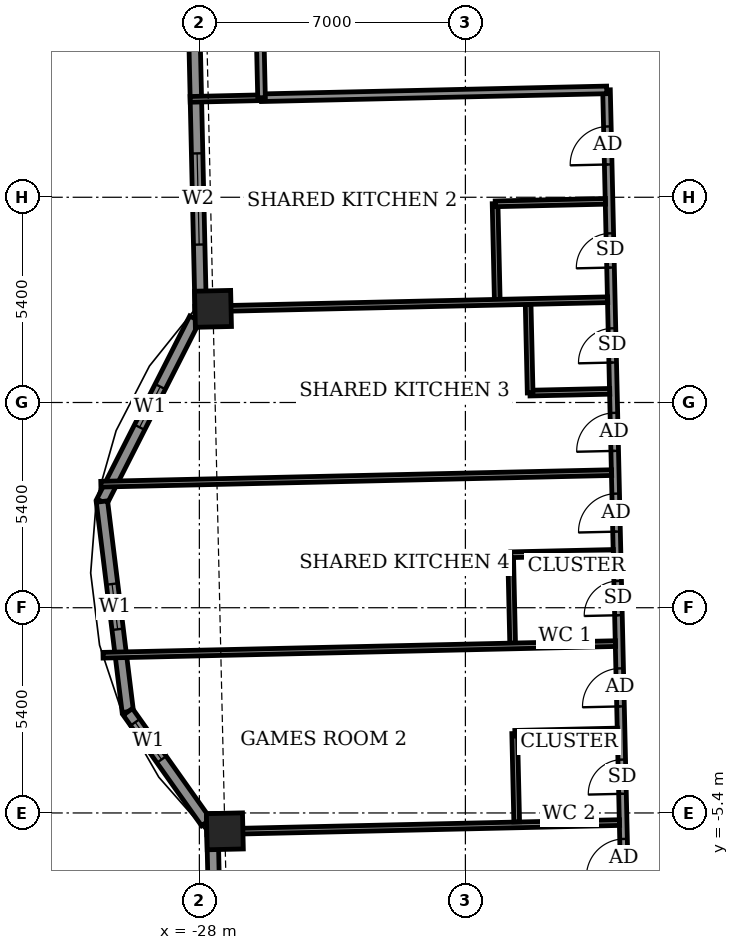
"""IFC4 building model, lengths in metres.
Left out: names, types, materials, properties, quantities, classifications, styles, units other than length and angle.
Written with IfcOpenShell. Run it as: python <this file> out.ifc"""

import sys

from ifc_helpers import new_model, si_unit, direction, frame, frame_2d, origin, origin_2d, place, context, subcontext, project, spatial, rectangle, extrude, element, fill, save


model = new_model("IFC4")
c1 = context("Model", 3, precision=1e-05, world=origin(), true_north=direction((0.0, 1.0)))
c2 = subcontext(c1, "Body", "Model", "MODEL_VIEW")
j1 = project(units=[si_unit("LENGTHUNIT", "METRE"), si_unit("PLANEANGLEUNIT", "RADIAN")], contexts=[c1])
p1 = place(None, origin())
s1 = spatial("IfcSite", under=j1, at=p1, CompositionType="ELEMENT")
p2 = place(p1, origin())
s2 = spatial("IfcBuilding", under=s1, at=p2, CompositionType="ELEMENT")
p3 = place(p2, frame((0.0, 0.0, 297.9)))
s3 = spatial("IfcBuildingStorey", under=s2, at=p3, CompositionType="ELEMENT", Elevation=297.9)
for number, where, z_axis, x_axis in (
    (1, (-27.329, -5.883, -0.55), (0.0, 0.0, 1.0), (0.023, -1.0, 0.0)),
    (2, (-27.641, 7.864, -0.55), (0.0, 0.0, 1.0), (0.023, -1.0, 0.0)),
):
    element("IfcColumn", number, at=place(p3, frame(where, z_axis=z_axis, x_axis=x_axis)), inside=s3, PredefinedType="COLUMN", context=c2, shape_type="SweptSolid", body=[
        extrude(rectangle(XDim=0.95, YDim=0.95, at=origin_2d()), origin(), (0.0, 0.0, 1.0), 3.6),
    ])
p4 = place(p3, frame((-28.297, 22.427, 0.0), z_axis=(0.0, 0.0, 1.0), x_axis=(0.02269714286, -0.999742386671, 0.0)))
e3 = element("IfcWall", 3, at=p4, inside=s3, PredefinedType="SOLIDWALL", context=c2, shape_type="SweptSolid", body=[
    extrude(rectangle(XDim=14.629, YDim=0.3, at=frame_2d((7.314, 0.0))), origin(), (0.0, 0.0, 1.0), 2.5),
])
p5 = place(p4, frame((3.002, 0.0, 0.0)))
e4 = element("IfcOpeningElement", 4, at=p5, cuts=e3, PredefinedType="OPENING", context=c2, shape_type="SweptSolid", body=[
    extrude(rectangle(XDim=1.5, YDim=2.4, at=frame_2d((0.75, 1.2))), frame((0.0, 0.16, 0.0), z_axis=(0.0, -1.0, 0.0), x_axis=(1.0, 0.0, 0.0)), (0.0, 0.0, 1.0), 0.32),
])
p6 = place(p4, frame((10.475, 0.0, 0.9)))
e5 = element("IfcOpeningElement", 5, at=p6, cuts=e3, PredefinedType="OPENING", context=c2, shape_type="SweptSolid", body=[
    extrude(rectangle(XDim=2.4, YDim=1.5, at=frame_2d((1.2, 0.75))), frame((0.0, 0.16, 0.0), z_axis=(0.0, -1.0, 0.0), x_axis=(1.0, 0.0, 0.0)), (0.0, 0.0, 1.0), 0.32),
])
p7 = place(p3, frame((-28.12, 7.608, 0.0), z_axis=(0.0, 0.0, 1.0), x_axis=(-0.45266802131, -0.891679125293, 0.0)))
e6 = element("IfcWall", 6, at=p7, inside=s3, PredefinedType="SOLIDWALL", context=c2, shape_type="SweptSolid", body=[
    extrude(rectangle(XDim=5.399, YDim=0.3, at=frame_2d((2.699, 0.0))), origin(), (0.0, 0.0, 1.0), 3.05),
])
p8 = place(p7, frame((2.008, 0.0, 0.9)))
e7 = element("IfcOpeningElement", 7, at=p8, cuts=e6, PredefinedType="OPENING", context=c2, shape_type="SweptSolid", body=[
    extrude(rectangle(XDim=1.2, YDim=1.5, at=frame_2d((0.6, 0.75))), frame((0.0, 0.16, 0.0), z_axis=(0.0, -1.0, 0.0), x_axis=(1.0, 0.0, 0.0)), (0.0, 0.0, 1.0), 0.32),
])
p9 = place(p3, frame((-30.564, 2.794, 0.0), z_axis=(0.0, 0.0, 1.0), x_axis=(0.122163831021, -0.992509948761, 0.0)))
e8 = element("IfcWall", 8, at=p9, inside=s3, PredefinedType="SOLIDWALL", context=c2, shape_type="SweptSolid", body=[
    extrude(rectangle(XDim=5.574, YDim=0.3, at=frame_2d((2.787, 0.0))), origin(), (0.0, 0.0, 1.0), 3.05),
])
p10 = place(p9, frame((2.187, 0.0, 0.9)))
e9 = element("IfcOpeningElement", 9, at=p10, cuts=e8, PredefinedType="OPENING", context=c2, shape_type="SweptSolid", body=[
    extrude(rectangle(XDim=1.2, YDim=1.5, at=frame_2d((0.6, 0.75))), frame((0.0, 0.16, 0.0), z_axis=(0.0, -1.0, 0.0), x_axis=(1.0, 0.0, 0.0)), (0.0, 0.0, 1.0), 0.32),
])
p11 = place(p3, frame((-29.883, -2.738, 0.0), z_axis=(0.0, 0.0, 1.0), x_axis=(0.578095163598, -0.815969351033, 0.0)))
e10 = element("IfcWall", 10, at=p11, inside=s3, PredefinedType="SOLIDWALL", context=c2, shape_type="SweptSolid", body=[
    extrude(rectangle(XDim=3.569, YDim=0.3, at=frame_2d((1.784, 0.0))), origin(), (0.0, 0.0, 1.0), 3.05),
])
p12 = place(p11, frame((0.338, 0.0, 0.9)))
e11 = element("IfcOpeningElement", 11, at=p12, cuts=e10, PredefinedType="OPENING", context=c2, shape_type="SweptSolid", body=[
    extrude(rectangle(XDim=1.2, YDim=1.5, at=frame_2d((0.6, 0.75))), frame((0.0, 0.16, 0.0), z_axis=(0.0, -1.0, 0.0), x_axis=(1.0, 0.0, 0.0)), (0.0, 0.0, 1.0), 0.32),
])
p13 = place(p3, frame((-27.665, -5.416, 0.0), z_axis=(0.0, 0.0, 1.0), x_axis=(0.022660024814, -0.999743228672, 0.0)))
e12 = element("IfcWall", 12, at=p13, inside=s3, PredefinedType="SOLIDWALL", context=c2, shape_type="SweptSolid", body=[
    extrude(rectangle(XDim=15.45, YDim=0.3, at=frame_2d((7.725, 0.0))), origin(), (0.0, 0.0, 1.0), 2.55),
])
p14 = place(p13, frame((1.975, 0.0, 0.0)))
e13 = element("IfcOpeningElement", 13, at=p14, cuts=e12, PredefinedType="OPENING", context=c2, shape_type="SweptSolid", body=[
    extrude(rectangle(XDim=1.5, YDim=2.4, at=frame_2d((0.75, 1.2))), frame((0.0, 0.16, 0.0), z_axis=(0.0, -1.0, 0.0), x_axis=(1.0, 0.0, 0.0)), (0.0, 0.0, 1.0), 0.32),
])
p15 = place(p13, frame((6.171, 0.0, 0.9)))
e14 = element("IfcOpeningElement", 14, at=p15, cuts=e12, PredefinedType="OPENING", context=c2, shape_type="SweptSolid", body=[
    extrude(rectangle(XDim=1.2, YDim=1.5, at=frame_2d((0.6, 0.75))), frame((0.0, 0.16, 0.0), z_axis=(0.0, -1.0, 0.0), x_axis=(1.0, 0.0, 0.0)), (0.0, 0.0, 1.0), 0.32),
])
p16 = place(p13, frame((8.05, 0.0, 0.9)))
e15 = element("IfcOpeningElement", 15, at=p16, cuts=e12, PredefinedType="OPENING", context=c2, shape_type="SweptSolid", body=[
    extrude(rectangle(XDim=0.9, YDim=1.5, at=frame_2d((0.45, 0.75))), frame((0.0, 0.16, 0.0), z_axis=(0.0, -1.0, 0.0), x_axis=(1.0, 0.0, 0.0)), (0.0, 0.0, 1.0), 0.32),
])
p17 = place(p13, frame((11.625, 0.0, 0.9)))
e16 = element("IfcOpeningElement", 16, at=p17, cuts=e12, PredefinedType="OPENING", context=c2, shape_type="SweptSolid", body=[
    extrude(rectangle(XDim=2.4, YDim=1.5, at=frame_2d((1.2, 0.75))), frame((0.0, 0.16, 0.0), z_axis=(0.0, -1.0, 0.0), x_axis=(1.0, 0.0, 0.0)), (0.0, 0.0, 1.0), 0.32),
])
p18 = place(p3, frame((-30.802, 10.917, 0.0), z_axis=(0.0, 0.0, 1.0), x_axis=(-0.022665943652, 0.999743094499, 0.0)))
e17 = element("IfcWall", 17, at=p18, inside=s3, PredefinedType="USERDEFINED", context=c2, shape_type="SweptSolid", body=[
    extrude(rectangle(XDim=6.0, YDim=0.55, at=frame_2d((3.0, 0.0))), origin(), (0.0, 0.0, 1.0), 0.8),
])
p19 = place(p3, frame((-30.348, -9.078, 0.0), z_axis=(0.0, 0.0, 1.0), x_axis=(-0.022677031611, 0.999742843054, 0.0)))
e18 = element("IfcWall", 18, at=p19, inside=s3, PredefinedType="USERDEFINED", context=c2, shape_type="SweptSolid", body=[
    extrude(rectangle(XDim=2.875, YDim=0.55, at=frame_2d((1.437, 0.0))), origin(), (0.0, 0.0, 1.0), 0.8),
])
p20 = place(p3, frame((-16.684, -12.919, 0.0), z_axis=(0.0, 0.0, 1.0), x_axis=(-0.022712214871, 0.999742044377, 0.0)))
e19 = element("IfcWall", 19, at=p20, inside=s3, PredefinedType="PARTITIONING", context=c2, shape_type="SweptSolid", body=[
    extrude(rectangle(XDim=26.551, YDim=0.2, at=frame_2d((13.275, 0.0))), origin(), (0.0, 0.0, 1.0), 3.05),
])
p21 = place(p20, frame((24.588, 0.0, 0.0)))
e20 = element("IfcOpeningElement", 20, at=p21, cuts=e19, PredefinedType="OPENING", context=c2, shape_type="SweptSolid", body=[
    extrude(rectangle(XDim=1.0, YDim=2.1, at=frame_2d((0.5, 1.05))), frame((0.0, 0.11, 0.0), z_axis=(0.0, -1.0, 0.0), x_axis=(1.0, 0.0, 0.0)), (0.0, 0.0, 1.0), 0.22),
])
p22 = place(p20, frame((21.875, 0.0, 0.0)))
e21 = element("IfcOpeningElement", 21, at=p22, cuts=e19, PredefinedType="OPENING", context=c2, shape_type="SweptSolid", body=[
    extrude(rectangle(XDim=0.9, YDim=2.1, at=frame_2d((0.45, 1.05))), frame((0.0, 0.11, 0.0), z_axis=(0.0, -1.0, 0.0), x_axis=(1.0, 0.0, 0.0)), (0.0, 0.0, 1.0), 0.22),
])
p23 = place(p20, frame((17.05, 0.0, 0.0)))
e22 = element("IfcOpeningElement", 22, at=p23, cuts=e19, PredefinedType="OPENING", context=c2, shape_type="SweptSolid", body=[
    extrude(rectangle(XDim=1.0, YDim=2.1, at=frame_2d((0.5, 1.05))), frame((0.0, 0.11, 0.0), z_axis=(0.0, -1.0, 0.0), x_axis=(1.0, 0.0, 0.0)), (0.0, 0.0, 1.0), 0.22),
])
p24 = place(p20, frame((19.375, 0.0, 0.0)))
e23 = element("IfcOpeningElement", 23, at=p24, cuts=e19, PredefinedType="OPENING", context=c2, shape_type="SweptSolid", body=[
    extrude(rectangle(XDim=0.9, YDim=2.1, at=frame_2d((0.45, 1.05))), frame((0.0, 0.11, 0.0), z_axis=(0.0, -1.0, 0.0), x_axis=(1.0, 0.0, 0.0)), (0.0, 0.0, 1.0), 0.22),
])
p25 = place(p20, frame((14.925, 0.0, 0.0)))
e24 = element("IfcOpeningElement", 24, at=p25, cuts=e19, PredefinedType="OPENING", context=c2, shape_type="SweptSolid", body=[
    extrude(rectangle(XDim=1.0, YDim=2.1, at=frame_2d((0.5, 1.05))), frame((0.0, 0.11, 0.0), z_axis=(0.0, -1.0, 0.0), x_axis=(1.0, 0.0, 0.0)), (0.0, 0.0, 1.0), 0.22),
])
p26 = place(p20, frame((12.725, 0.0, 0.0)))
e25 = element("IfcOpeningElement", 25, at=p26, cuts=e19, PredefinedType="OPENING", context=c2, shape_type="SweptSolid", body=[
    extrude(rectangle(XDim=0.9, YDim=2.1, at=frame_2d((0.45, 1.05))), frame((0.0, 0.11, 0.0), z_axis=(0.0, -1.0, 0.0), x_axis=(1.0, 0.0, 0.0)), (0.0, 0.0, 1.0), 0.22),
])
p27 = place(p20, frame((10.325, 0.0, 0.0)))
e26 = element("IfcOpeningElement", 26, at=p27, cuts=e19, PredefinedType="OPENING", context=c2, shape_type="SweptSolid", body=[
    extrude(rectangle(XDim=1.0, YDim=2.1, at=frame_2d((0.5, 1.05))), frame((0.0, 0.11, 0.0), z_axis=(0.0, -1.0, 0.0), x_axis=(1.0, 0.0, 0.0)), (0.0, 0.0, 1.0), 0.22),
])
p28 = place(p20, frame((8.025, 0.0, 0.0)))
e27 = element("IfcOpeningElement", 27, at=p28, cuts=e19, PredefinedType="OPENING", context=c2, shape_type="SweptSolid", body=[
    extrude(rectangle(XDim=0.9, YDim=2.1, at=frame_2d((0.45, 1.05))), frame((0.0, 0.11, 0.0), z_axis=(0.0, -1.0, 0.0), x_axis=(1.0, 0.0, 0.0)), (0.0, 0.0, 1.0), 0.22),
])
p29 = place(p20, frame((5.837, 0.0, 0.0)))
e28 = element("IfcOpeningElement", 28, at=p29, cuts=e19, PredefinedType="OPENING", context=c2, shape_type="SweptSolid", body=[
    extrude(rectangle(XDim=1.0, YDim=2.1, at=frame_2d((0.5, 1.05))), frame((0.0, 0.11, 0.0), z_axis=(0.0, -1.0, 0.0), x_axis=(1.0, 0.0, 0.0)), (0.0, 0.0, 1.0), 0.22),
])
p30 = place(p20, frame((3.75, 0.0, 0.0)))
e29 = element("IfcOpeningElement", 29, at=p30, cuts=e19, PredefinedType="OPENING", context=c2, shape_type="SweptSolid", body=[
    extrude(rectangle(XDim=0.9, YDim=2.1, at=frame_2d((0.45, 1.05))), frame((0.0, 0.11, 0.0), z_axis=(0.0, -1.0, 0.0), x_axis=(1.0, 0.0, 0.0)), (0.0, 0.0, 1.0), 0.22),
])
p31 = place(p3, frame((-27.804, -5.899, 0.0), z_axis=(0.0, 0.0, 1.0), x_axis=(0.999743850541, 0.02263257177, 0.0)))
e30 = element("IfcWall", 30, at=p31, inside=s3, PredefinedType="PARTITIONING", context=c2, shape_type="SweptSolid", body=[
    extrude(rectangle(XDim=10.863, YDim=0.15, at=frame_2d((5.431, 0.0))), origin(), (0.0, 0.0, 1.0), 3.05),
])
p32 = place(p3, frame((-19.65, -5.634, 0.0), z_axis=(0.0, 0.0, 1.0), x_axis=(-0.02279059109, 0.999740260747, 0.0)))
e31 = element("IfcWall", 31, at=p32, inside=s3, PredefinedType="PARTITIONING", context=c2, shape_type="SweptSolid", body=[
    extrude(rectangle(XDim=2.324, YDim=0.15, at=frame_2d((1.162, 0.0))), origin(), (0.0, 0.0, 1.0), 3.05),
])
p33 = place(p3, frame((-19.698, -3.304, 0.0), z_axis=(0.0, 0.0, 1.0), x_axis=(0.999744396973, 0.02260842146, 0.0)))
e32 = element("IfcWall", 32, at=p33, inside=s3, PredefinedType="PARTITIONING", context=c2, shape_type="SweptSolid", body=[
    extrude(rectangle(XDim=2.7, YDim=0.15, at=frame_2d((1.35, 0.0))), origin(), (0.0, 0.0, 1.0), 3.05),
])
p34 = place(p3, frame((-19.757, -0.935, 0.0), z_axis=(0.0, 0.0, 1.0), x_axis=(-0.02279059109, 0.999740260747, 0.0)))
e33 = element("IfcWall", 33, at=p34, inside=s3, PredefinedType="PARTITIONING", context=c2, shape_type="SweptSolid", body=[
    extrude(rectangle(XDim=2.324, YDim=0.15, at=frame_2d((1.162, 0.0))), origin(), (0.0, 0.0, 1.0), 3.05),
])
p35 = place(p3, frame((-30.535, -1.25, 0.0), z_axis=(0.0, 0.0, 1.0), x_axis=(0.999742750552, 0.022681109296, 0.0)))
e34 = element("IfcWall", 34, at=p35, inside=s3, PredefinedType="PARTITIONING", context=c2, shape_type="SweptSolid", body=[
    extrude(rectangle(XDim=13.487, YDim=0.15, at=frame_2d((6.744, 0.0))), origin(), (0.0, 0.0, 1.0), 2.05),
])
p36 = place(p3, frame((-19.805, 1.394, 0.0), z_axis=(0.0, 0.0, 1.0), x_axis=(0.999736346258, 0.022961663075, 0.0)))
e35 = element("IfcWall", 35, at=p36, inside=s3, PredefinedType="PARTITIONING", context=c2, shape_type="SweptSolid", body=[
    extrude(rectangle(XDim=2.701, YDim=0.15, at=frame_2d((1.35, 0.0))), origin(), (0.0, 0.0, 1.0), 3.05),
])
p37 = place(p3, frame((-30.592, 3.25, 0.0), z_axis=(0.0, 0.0, 1.0), x_axis=(0.999742678725, 0.022684275074, 0.0)))
e36 = element("IfcWall", 36, at=p37, inside=s3, PredefinedType="PARTITIONING", context=c2, shape_type="SweptSolid", body=[
    extrude(rectangle(XDim=13.442, YDim=0.15, at=frame_2d((6.721, 0.0))), origin(), (0.0, 0.0, 1.0), 2.05),
])
p38 = place(p3, frame((-19.301, 5.647, 0.0), z_axis=(0.0, 0.0, 1.0), x_axis=(0.999748159451, 0.022441427631, 0.0)))
e37 = element("IfcWall", 37, at=p38, inside=s3, PredefinedType="PARTITIONING", context=c2, shape_type="SweptSolid", body=[
    extrude(rectangle(XDim=2.1, YDim=0.15, at=frame_2d((1.05, 0.0))), origin(), (0.0, 0.0, 1.0), 3.05),
])
p39 = place(p3, frame((-19.296, 5.652, 0.0), z_axis=(0.0, 0.0, 1.0), x_axis=(-0.022895561926, 0.999737862264, 0.0)))
e38 = element("IfcWall", 38, at=p39, inside=s3, PredefinedType="PARTITIONING", context=c2, shape_type="SweptSolid", body=[
    extrude(rectangle(XDim=2.324, YDim=0.15, at=frame_2d((1.162, 0.0))), origin(), (0.0, 0.0, 1.0), 3.05),
])
p40 = place(p3, frame((-20.162, 8.108, 0.0), z_axis=(0.0, 0.0, 1.0), x_axis=(-0.022530308093, 0.999746160391, 0.0)))
e39 = element("IfcWall", 39, at=p40, inside=s3, PredefinedType="PARTITIONING", context=c2, shape_type="SweptSolid", body=[
    extrude(rectangle(XDim=2.525, YDim=0.15, at=frame_2d((1.262, 0.0))), origin(), (0.0, 0.0, 1.0), 3.05),
])
p41 = place(p3, frame((-28.116, 7.857, 0.0), z_axis=(0.0, 0.0, 1.0), x_axis=(0.999741301527, 0.022744890004, 0.0)))
e40 = element("IfcWall", 40, at=p41, inside=s3, PredefinedType="PARTITIONING", context=c2, shape_type="SweptSolid", body=[
    extrude(rectangle(XDim=10.863, YDim=0.15, at=frame_2d((5.431, 0.0))), origin(), (0.0, 0.0, 1.0), 3.05),
])
p42 = place(p3, frame((-20.214, 10.627, 0.0), z_axis=(0.0, 0.0, 1.0), x_axis=(0.999739701447, 0.022815112345, 0.0)))
e41 = element("IfcWall", 41, at=p42, inside=s3, PredefinedType="PARTITIONING", context=c2, shape_type="SweptSolid", body=[
    extrude(rectangle(XDim=2.9, YDim=0.15, at=frame_2d((1.45, 0.0))), origin(), (0.0, 0.0, 1.0), 3.05),
])
p43 = place(p3, frame((-28.242, 13.376, 0.0), z_axis=(0.0, 0.0, 1.0), x_axis=(0.999738606422, 0.022863045053, 0.0)))
e42 = element("IfcWall", 42, at=p43, inside=s3, PredefinedType="PARTITIONING", context=c2, shape_type="SweptSolid", body=[
    extrude(rectangle(XDim=1.879, YDim=0.15, at=frame_2d((0.94, 0.0))), origin(), (0.0, 0.0, 1.0), 2.5),
])
p44 = place(p3, frame((-26.367, 13.419, 0.0), z_axis=(0.0, 0.0, 1.0), x_axis=(0.999742888587, 0.022675024131, 0.0)))
e43 = element("IfcWall", 43, at=p44, inside=s3, PredefinedType="PARTITIONING", context=c2, shape_type="SweptSolid", body=[
    extrude(rectangle(XDim=9.087, YDim=0.2, at=frame_2d((4.544, 0.0))), origin(), (0.0, 0.0, 1.0), 3.05),
])
p45 = place(p3, frame((-26.364, 13.419, 0.0), z_axis=(0.0, 0.0, 1.0), x_axis=(-0.022632637625, 0.99974384905, 0.0)))
e44 = element("IfcWall", 44, at=p45, inside=s3, PredefinedType="PARTITIONING", context=c2, shape_type="SweptSolid", body=[
    extrude(rectangle(XDim=1.5, YDim=0.2, at=frame_2d((0.75, 0.0))), origin(), (0.0, 0.0, 1.0), 3.05),
])
p46 = place(p6, origin())
e45 = element("IfcWindow", 45, at=p46, inside=s3, PartitioningType="DOUBLE_PANEL_VERTICAL", PredefinedType="WINDOW", context=c2, shape_type="SweptSolid", body=[
    extrude(rectangle(XDim=2.4, YDim=1.5, at=frame_2d((1.2, 0.75))), frame((0.0, 0.03, 0.0), z_axis=(0.0, -1.0, 0.0), x_axis=(1.0, 0.0, 0.0)), (0.0, 0.0, 1.0), 0.06),
])
fill(e5, e45)
p47 = place(p8, origin())
e46 = element("IfcWindow", 46, at=p47, inside=s3, PartitioningType="SINGLE_PANEL", PredefinedType="WINDOW", context=c2, shape_type="SweptSolid", body=[
    extrude(rectangle(XDim=1.2, YDim=1.5, at=frame_2d((0.6, 0.75))), frame((0.0, 0.03, 0.0), z_axis=(0.0, -1.0, 0.0), x_axis=(1.0, 0.0, 0.0)), (0.0, 0.0, 1.0), 0.06),
])
fill(e7, e46)
p48 = place(p10, origin())
e47 = element("IfcWindow", 47, at=p48, inside=s3, PartitioningType="SINGLE_PANEL", PredefinedType="WINDOW", context=c2, shape_type="SweptSolid", body=[
    extrude(rectangle(XDim=1.2, YDim=1.5, at=frame_2d((0.6, 0.75))), frame((0.0, 0.03, 0.0), z_axis=(0.0, -1.0, 0.0), x_axis=(1.0, 0.0, 0.0)), (0.0, 0.0, 1.0), 0.06),
])
fill(e9, e47)
p49 = place(p12, origin())
e48 = element("IfcWindow", 48, at=p49, inside=s3, PartitioningType="SINGLE_PANEL", PredefinedType="WINDOW", context=c2, shape_type="SweptSolid", body=[
    extrude(rectangle(XDim=1.2, YDim=1.5, at=frame_2d((0.6, 0.75))), frame((0.0, 0.03, 0.0), z_axis=(0.0, -1.0, 0.0), x_axis=(1.0, 0.0, 0.0)), (0.0, 0.0, 1.0), 0.06),
])
fill(e11, e48)
p50 = place(p21, origin())
e49 = element("IfcDoor", 49, at=p50, inside=s3, OperationType="SINGLE_SWING_LEFT", PredefinedType="DOOR", context=c2, shape_type="SweptSolid", body=[
    extrude(rectangle(XDim=1.0, YDim=2.1, at=frame_2d((0.5, 1.05))), frame((0.0, 0.025, 0.0), z_axis=(0.0, -1.0, 0.0), x_axis=(1.0, 0.0, 0.0)), (0.0, 0.0, 1.0), 0.05),
])
fill(e20, e49)
p51 = place(p22, origin())
e50 = element("IfcDoor", 50, at=p51, inside=s3, OperationType="SINGLE_SWING_LEFT", PredefinedType="DOOR", context=c2, shape_type="SweptSolid", body=[
    extrude(rectangle(XDim=0.9, YDim=2.1, at=frame_2d((0.45, 1.05))), frame((0.0, 0.025, 0.0), z_axis=(0.0, -1.0, 0.0), x_axis=(1.0, 0.0, 0.0)), (0.0, 0.0, 1.0), 0.05),
])
fill(e21, e50)
p52 = place(p23, origin())
e51 = element("IfcDoor", 51, at=p52, inside=s3, OperationType="SINGLE_SWING_RIGHT", PredefinedType="DOOR", context=c2, shape_type="SweptSolid", body=[
    extrude(rectangle(XDim=1.0, YDim=2.1, at=frame_2d((0.5, 1.05))), frame((0.0, 0.025, 0.0), z_axis=(0.0, -1.0, 0.0), x_axis=(1.0, 0.0, 0.0)), (0.0, 0.0, 1.0), 0.05),
])
fill(e22, e51)
p53 = place(p24, origin())
e52 = element("IfcDoor", 52, at=p53, inside=s3, OperationType="SINGLE_SWING_RIGHT", PredefinedType="DOOR", context=c2, shape_type="SweptSolid", body=[
    extrude(rectangle(XDim=0.9, YDim=2.1, at=frame_2d((0.45, 1.05))), frame((0.0, 0.025, 0.0), z_axis=(0.0, -1.0, 0.0), x_axis=(1.0, 0.0, 0.0)), (0.0, 0.0, 1.0), 0.05),
])
fill(e23, e52)
p54 = place(p25, origin())
e53 = element("IfcDoor", 53, at=p54, inside=s3, OperationType="SINGLE_SWING_LEFT", PredefinedType="DOOR", context=c2, shape_type="SweptSolid", body=[
    extrude(rectangle(XDim=1.0, YDim=2.1, at=frame_2d((0.5, 1.05))), frame((0.0, 0.025, 0.0), z_axis=(0.0, -1.0, 0.0), x_axis=(1.0, 0.0, 0.0)), (0.0, 0.0, 1.0), 0.05),
])
fill(e24, e53)
p55 = place(p26, origin())
e54 = element("IfcDoor", 54, at=p55, inside=s3, OperationType="SINGLE_SWING_LEFT", PredefinedType="DOOR", context=c2, shape_type="SweptSolid", body=[
    extrude(rectangle(XDim=0.9, YDim=2.1, at=frame_2d((0.45, 1.05))), frame((0.0, 0.025, 0.0), z_axis=(0.0, -1.0, 0.0), x_axis=(1.0, 0.0, 0.0)), (0.0, 0.0, 1.0), 0.05),
])
fill(e25, e54)
p56 = place(p27, origin())
e55 = element("IfcDoor", 55, at=p56, inside=s3, OperationType="SINGLE_SWING_RIGHT", PredefinedType="DOOR", context=c2, shape_type="SweptSolid", body=[
    extrude(rectangle(XDim=1.0, YDim=2.1, at=frame_2d((0.5, 1.05))), frame((0.0, 0.025, 0.0), z_axis=(0.0, -1.0, 0.0), x_axis=(1.0, 0.0, 0.0)), (0.0, 0.0, 1.0), 0.05),
])
fill(e26, e55)
p57 = place(p28, origin())
e56 = element("IfcDoor", 56, at=p57, inside=s3, OperationType="SINGLE_SWING_RIGHT", PredefinedType="DOOR", context=c2, shape_type="SweptSolid", body=[
    extrude(rectangle(XDim=0.9, YDim=2.1, at=frame_2d((0.45, 1.05))), frame((0.0, 0.025, 0.0), z_axis=(0.0, -1.0, 0.0), x_axis=(1.0, 0.0, 0.0)), (0.0, 0.0, 1.0), 0.05),
])
fill(e27, e56)
p58 = place(p29, origin())
e57 = element("IfcDoor", 57, at=p58, inside=s3, OperationType="SINGLE_SWING_LEFT", PredefinedType="DOOR", context=c2, shape_type="SweptSolid", body=[
    extrude(rectangle(XDim=1.0, YDim=2.1, at=frame_2d((0.5, 1.05))), frame((0.0, 0.025, 0.0), z_axis=(0.0, -1.0, 0.0), x_axis=(1.0, 0.0, 0.0)), (0.0, 0.0, 1.0), 0.05),
])
fill(e28, e57)
save(model, sys.argv[1])
